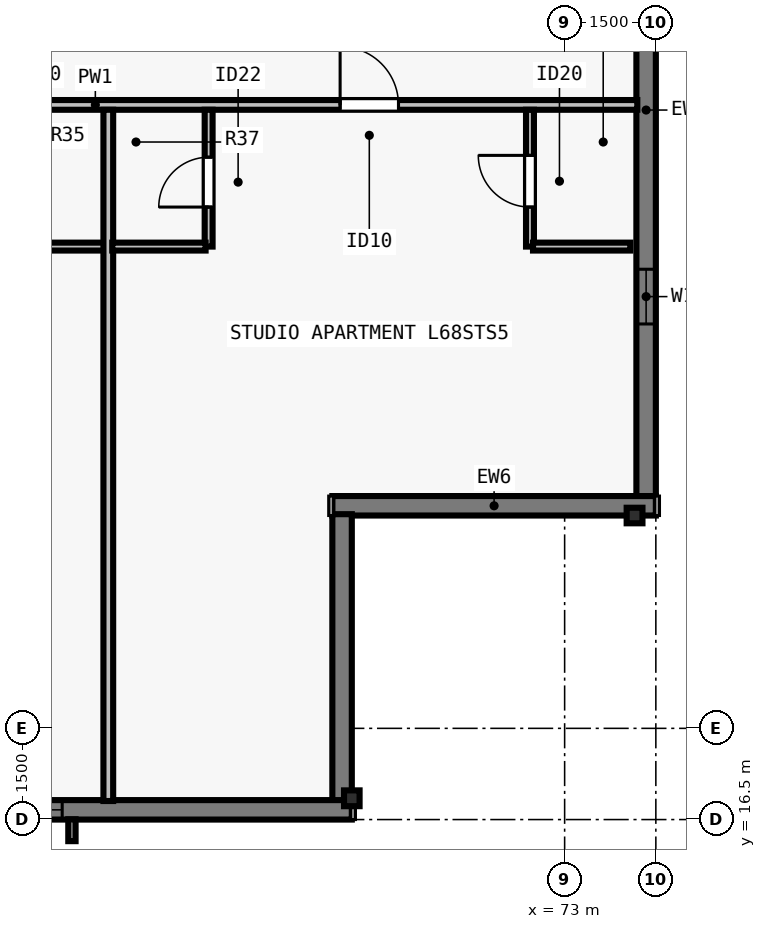
"""IFC4 building model, lengths in metres.
Left out: names, types, materials, properties, quantities, classifications, styles, units other than length and angle.
Written with IfcOpenShell. Run it as: python <this file> out.ifc"""

import sys

from ifc_helpers import new_model, si_unit, direction, frame, frame_2d, origin, origin_2d, place, context, subcontext, project, spatial, rectangle, i_section, extrude, element, fill, save


model = new_model("IFC4")
c1 = context("Model", 3, precision=1e-05, world=origin(), true_north=direction((0.0, 1.0)))
c2 = subcontext(c1, "Body", "Model", "MODEL_VIEW")
j1 = project(units=[si_unit("LENGTHUNIT", "METRE"), si_unit("PLANEANGLEUNIT", "RADIAN")], contexts=[c1])
p1 = place(None, origin())
s1 = spatial("IfcSite", under=j1, at=p1, CompositionType="ELEMENT")
p2 = place(p1, origin())
s2 = spatial("IfcBuilding", under=s1, at=p2, CompositionType="ELEMENT")
p3 = place(p2, frame((0.0, 0.0, 248.0)))
s3 = spatial("IfcBuildingStorey", under=s2, at=p3, CompositionType="ELEMENT", Elevation=248.0)
for number, where, z_axis, x_axis in (
    (1, (69.5, 16.85, 0.0), (0.0, 0.0, 1.0), (1.0, 0.0, 0.0)),
    (2, (74.15, 21.5, 0.0), (0.0, 0.0, 1.0), (0.0, 1.0, 0.0)),
):
    element("IfcColumn", number, at=place(p3, frame(where, z_axis=z_axis, x_axis=x_axis)), inside=s3, PredefinedType="COLUMN", context=c2, shape_type="SweptSolid", body=[
        extrude(i_section(OverallWidth=0.256, OverallDepth=0.26, WebThickness=0.01, FlangeThickness=0.017, FilletRadius=0.013, at=origin_2d()), origin(), (0.0, 0.0, 1.0), 3.5),
    ])
p4 = place(p3, frame((74.34, 56.5, 0.0), z_axis=(0.0, 0.0, 1.0), x_axis=(0.0, -1.0, 0.0)))
e3 = element("IfcWall", 3, at=p4, inside=s3, PredefinedType="SOLIDWALL", context=c2, shape_type="SweptSolid", body=[
    extrude(rectangle(XDim=34.702, YDim=0.32, at=frame_2d((17.351, 0.0))), origin(), (0.0, 0.0, 1.0), 3.29),
])
p5 = place(p4, frame((4.763, 0.0, 0.8)))
e4 = element("IfcOpeningElement", 4, at=p5, cuts=e3, PredefinedType="OPENING", context=c2, shape_type="SweptSolid", body=[
    extrude(rectangle(XDim=1.55, YDim=1.678, at=frame_2d((0.775, 0.839))), frame((0.0, 0.17, 0.0), z_axis=(0.0, -1.0, 0.0), x_axis=(1.0, 0.0, 0.0)), (0.0, 0.0, 1.0), 0.34),
])
p6 = place(p4, frame((9.238, 0.0, 0.8)))
e5 = element("IfcOpeningElement", 5, at=p6, cuts=e3, PredefinedType="OPENING", context=c2, shape_type="SweptSolid", body=[
    extrude(rectangle(XDim=1.85, YDim=1.678, at=frame_2d((0.925, 0.839))), frame((0.0, 0.17, 0.0), z_axis=(0.0, -1.0, 0.0), x_axis=(1.0, 0.0, 0.0)), (0.0, 0.0, 1.0), 0.34),
])
p7 = place(p4, frame((13.488, 0.0, 0.8)))
e6 = element("IfcOpeningElement", 6, at=p7, cuts=e3, PredefinedType="OPENING", context=c2, shape_type="SweptSolid", body=[
    extrude(rectangle(XDim=1.85, YDim=1.678, at=frame_2d((0.925, 0.839))), frame((0.0, 0.17, 0.0), z_axis=(0.0, -1.0, 0.0), x_axis=(1.0, 0.0, 0.0)), (0.0, 0.0, 1.0), 0.34),
])
p8 = place(p4, frame((18.264, 0.0, 0.8)))
e7 = element("IfcOpeningElement", 7, at=p8, cuts=e3, PredefinedType="OPENING", context=c2, shape_type="SweptSolid", body=[
    extrude(rectangle(XDim=1.55, YDim=1.678, at=frame_2d((0.775, 0.839))), frame((0.0, 0.17, 0.0), z_axis=(0.0, -1.0, 0.0), x_axis=(1.0, 0.0, 0.0)), (0.0, 0.0, 1.0), 0.34),
])
p9 = place(p4, frame((24.164, 0.0, 0.8)))
e8 = element("IfcOpeningElement", 8, at=p9, cuts=e3, PredefinedType="OPENING", context=c2, shape_type="SweptSolid", body=[
    extrude(rectangle(XDim=1.55, YDim=1.678, at=frame_2d((0.775, 0.839))), frame((0.0, 0.17, 0.0), z_axis=(0.0, -1.0, 0.0), x_axis=(1.0, 0.0, 0.0)), (0.0, 0.0, 1.0), 0.34),
])
p10 = place(p4, frame((30.95, 0.0, 0.8)))
e9 = element("IfcOpeningElement", 9, at=p10, cuts=e3, PredefinedType="OPENING", context=c2, shape_type="SweptSolid", body=[
    extrude(rectangle(XDim=0.9, YDim=1.678, at=frame_2d((0.45, 0.839))), frame((0.0, 0.17, 0.0), z_axis=(0.0, -1.0, 0.0), x_axis=(1.0, 0.0, 0.0)), (0.0, 0.0, 1.0), 0.34),
])
p11 = place(p3, frame((74.5, 21.66, 0.0), z_axis=(0.0, 0.0, 1.0), x_axis=(-1.0, 0.0, 0.0)))
e10 = element("IfcWall", 10, at=p11, inside=s3, PredefinedType="SOLIDWALL", context=c2, shape_type="SweptSolid", body=[
    extrude(rectangle(XDim=5.32, YDim=0.32, at=frame_2d((2.66, 0.0))), origin(), (0.0, 0.0, 1.0), 3.29),
])
p12 = place(p3, frame((69.34, 21.522, 0.0), z_axis=(0.0, 0.0, 1.0), x_axis=(0.0, -1.0, 0.0)))
e11 = element("IfcWall", 11, at=p12, inside=s3, PredefinedType="SOLIDWALL", context=c2, shape_type="SweptSolid", body=[
    extrude(rectangle(XDim=4.724, YDim=0.32, at=frame_2d((2.362, 0.0))), origin(), (0.0, 0.0, 1.0), 3.29),
])
p13 = place(p3, frame((69.5, 16.66, 0.0), z_axis=(0.0, 0.0, 1.0), x_axis=(-1.0, 0.0, 0.0)))
e12 = element("IfcWall", 12, at=p13, inside=s3, PredefinedType="SOLIDWALL", context=c2, shape_type="SweptSolid", body=[
    extrude(rectangle(XDim=34.702, YDim=0.32, at=frame_2d((17.351, 0.0))), origin(), (0.0, 0.0, 1.0), 3.29),
])
p14 = place(p13, frame((4.763, 0.0, 0.8)))
e13 = element("IfcOpeningElement", 13, at=p14, cuts=e12, PredefinedType="OPENING", context=c2, shape_type="SweptSolid", body=[
    extrude(rectangle(XDim=1.55, YDim=1.678, at=frame_2d((0.775, 0.839))), frame((0.0, 0.17, 0.0), z_axis=(0.0, -1.0, 0.0), x_axis=(1.0, 0.0, 0.0)), (0.0, 0.0, 1.0), 0.34),
])
p15 = place(p13, frame((7.988, 0.0, 0.8)))
e14 = element("IfcOpeningElement", 14, at=p15, cuts=e12, PredefinedType="OPENING", context=c2, shape_type="SweptSolid", body=[
    extrude(rectangle(XDim=1.85, YDim=1.678, at=frame_2d((0.925, 0.839))), frame((0.0, 0.17, 0.0), z_axis=(0.0, -1.0, 0.0), x_axis=(1.0, 0.0, 0.0)), (0.0, 0.0, 1.0), 0.34),
])
p16 = place(p13, frame((10.263, 0.0, 0.8)))
e15 = element("IfcOpeningElement", 15, at=p16, cuts=e12, PredefinedType="OPENING", context=c2, shape_type="SweptSolid", body=[
    extrude(rectangle(XDim=1.55, YDim=1.678, at=frame_2d((0.775, 0.839))), frame((0.0, 0.17, 0.0), z_axis=(0.0, -1.0, 0.0), x_axis=(1.0, 0.0, 0.0)), (0.0, 0.0, 1.0), 0.34),
])
p17 = place(p13, frame((14.738, 0.0, 0.8)))
e16 = element("IfcOpeningElement", 16, at=p17, cuts=e12, PredefinedType="OPENING", context=c2, shape_type="SweptSolid", body=[
    extrude(rectangle(XDim=1.85, YDim=1.678, at=frame_2d((0.925, 0.839))), frame((0.0, 0.17, 0.0), z_axis=(0.0, -1.0, 0.0), x_axis=(1.0, 0.0, 0.0)), (0.0, 0.0, 1.0), 0.34),
])
p18 = place(p13, frame((18.264, 0.0, 0.8)))
e17 = element("IfcOpeningElement", 17, at=p18, cuts=e12, PredefinedType="OPENING", context=c2, shape_type="SweptSolid", body=[
    extrude(rectangle(XDim=1.55, YDim=1.678, at=frame_2d((0.775, 0.839))), frame((0.0, 0.17, 0.0), z_axis=(0.0, -1.0, 0.0), x_axis=(1.0, 0.0, 0.0)), (0.0, 0.0, 1.0), 0.34),
])
p19 = place(p13, frame((25.014, 0.0, 0.8)))
e18 = element("IfcOpeningElement", 18, at=p19, cuts=e12, PredefinedType="OPENING", context=c2, shape_type="SweptSolid", body=[
    extrude(rectangle(XDim=1.55, YDim=1.678, at=frame_2d((0.775, 0.839))), frame((0.0, 0.17, 0.0), z_axis=(0.0, -1.0, 0.0), x_axis=(1.0, 0.0, 0.0)), (0.0, 0.0, 1.0), 0.34),
])
p20 = place(p13, frame((28.24, 0.0, 0.8)))
e19 = element("IfcOpeningElement", 19, at=p20, cuts=e12, PredefinedType="OPENING", context=c2, shape_type="SweptSolid", body=[
    extrude(rectangle(XDim=1.85, YDim=1.678, at=frame_2d((0.925, 0.839))), frame((0.0, 0.17, 0.0), z_axis=(0.0, -1.0, 0.0), x_axis=(1.0, 0.0, 0.0)), (0.0, 0.0, 1.0), 0.34),
])
p21 = place(p3, frame((29.915, 28.252, 0.0), z_axis=(0.0, 0.0, 1.0), x_axis=(1.0, 0.0, 0.0)))
e20 = element("IfcWall", 20, at=p21, inside=s3, PredefinedType="PARTITIONING", context=c2, shape_type="SweptSolid", body=[
    extrude(rectangle(XDim=44.28, YDim=0.16, at=frame_2d((22.14, 0.0))), origin(), (0.0, 0.0, 1.0), 2.958),
])
p22 = place(p21, frame((5.002, 0.0, 0.0)))
e21 = element("IfcOpeningElement", 21, at=p22, cuts=e20, PredefinedType="OPENING", context=c2, shape_type="SweptSolid", body=[
    extrude(rectangle(XDim=0.96, YDim=2.18, at=frame_2d((0.48, 1.09))), frame((0.0, 0.09, 0.0), z_axis=(0.0, -1.0, 0.0), x_axis=(1.0, 0.0, 0.0)), (0.0, 0.0, 1.0), 0.18),
])
p23 = place(p21, frame((12.718, 0.0, 0.0)))
e22 = element("IfcOpeningElement", 22, at=p23, cuts=e20, PredefinedType="OPENING", context=c2, shape_type="SweptSolid", body=[
    extrude(rectangle(XDim=0.96, YDim=2.18, at=frame_2d((0.48, 1.09))), frame((0.0, 0.09, 0.0), z_axis=(0.0, -1.0, 0.0), x_axis=(1.0, 0.0, 0.0)), (0.0, 0.0, 1.0), 0.18),
])
p24 = place(p21, frame((21.55, 0.0, 0.0)))
e23 = element("IfcOpeningElement", 23, at=p24, cuts=e20, PredefinedType="OPENING", context=c2, shape_type="SweptSolid", body=[
    extrude(rectangle(XDim=0.96, YDim=2.18, at=frame_2d((0.48, 1.09))), frame((0.0, 0.09, 0.0), z_axis=(0.0, -1.0, 0.0), x_axis=(1.0, 0.0, 0.0)), (0.0, 0.0, 1.0), 0.18),
])
p25 = place(p21, frame((30.382, 0.0, 0.0)))
e24 = element("IfcOpeningElement", 24, at=p25, cuts=e20, PredefinedType="OPENING", context=c2, shape_type="SweptSolid", body=[
    extrude(rectangle(XDim=0.96, YDim=2.18, at=frame_2d((0.48, 1.09))), frame((0.0, 0.09, 0.0), z_axis=(0.0, -1.0, 0.0), x_axis=(1.0, 0.0, 0.0)), (0.0, 0.0, 1.0), 0.18),
])
p26 = place(p21, frame((39.393, 0.0, 0.0)))
e25 = element("IfcOpeningElement", 25, at=p26, cuts=e20, PredefinedType="OPENING", context=c2, shape_type="SweptSolid", body=[
    extrude(rectangle(XDim=0.96, YDim=2.18, at=frame_2d((0.48, 1.09))), frame((0.0, 0.09, 0.0), z_axis=(0.0, -1.0, 0.0), x_axis=(1.0, 0.0, 0.0)), (0.0, 0.0, 1.0), 0.18),
])
p27 = place(p3, frame((63.896, 25.923, 0.0), z_axis=(0.0, 0.0, 1.0), x_axis=(1.0, 0.0, 0.0)))
e26 = element("IfcWall", 26, at=p27, inside=s3, PredefinedType="PLUMBINGWALL", context=c2, shape_type="SweptSolid", body=[
    extrude(rectangle(XDim=1.6, YDim=0.13, at=frame_2d((0.8, 0.0))), origin(), (0.0, 0.0, 1.0), 3.29),
])
p28 = place(p3, frame((65.496, 16.805, 0.0), z_axis=(0.0, 0.0, 1.0), x_axis=(0.0, 1.0, 0.0)))
e27 = element("IfcWall", 27, at=p28, inside=s3, PredefinedType="PARTITIONING", context=c2, shape_type="SweptSolid", body=[
    extrude(rectangle(XDim=11.368, YDim=0.16, at=frame_2d((5.684, 0.0))), origin(), (0.0, 0.0, 1.0), 2.573),
])
p29 = place(p3, frame((67.146, 25.923, 0.0), z_axis=(0.0, 0.0, 1.0), x_axis=(0.0, 1.0, 0.0)))
e28 = element("IfcWall", 28, at=p29, inside=s3, PredefinedType="PLUMBINGWALL", context=c2, shape_type="SweptSolid", body=[
    extrude(rectangle(XDim=2.25, YDim=0.13, at=frame_2d((1.125, 0.0))), origin(), (0.0, 0.0, 1.0), 3.29),
])
p30 = place(p29, frame((0.65, 0.0, 0.0)))
e29 = element("IfcOpeningElement", 29, at=p30, cuts=e28, PredefinedType="OPENING", context=c2, shape_type="SweptSolid", body=[
    extrude(rectangle(XDim=0.82, YDim=2.1, at=frame_2d((0.41, 1.05))), frame((0.0, 0.075, 0.0), z_axis=(0.0, -1.0, 0.0), x_axis=(1.0, 0.0, 0.0)), (0.0, 0.0, 1.0), 0.15),
])
p31 = place(p3, frame((65.561, 25.923, 0.0), z_axis=(0.0, 0.0, 1.0), x_axis=(1.0, 0.0, 0.0)))
e30 = element("IfcWall", 30, at=p31, inside=s3, PredefinedType="PLUMBINGWALL", context=c2, shape_type="SweptSolid", body=[
    extrude(rectangle(XDim=1.535, YDim=0.13, at=frame_2d((0.768, 0.0))), origin(), (0.0, 0.0, 1.0), 3.29),
])
p32 = place(p3, frame((72.43, 25.923, 0.0), z_axis=(0.0, 0.0, 1.0), x_axis=(0.0, 1.0, 0.0)))
e31 = element("IfcWall", 31, at=p32, inside=s3, PredefinedType="PLUMBINGWALL", context=c2, shape_type="SweptSolid", body=[
    extrude(rectangle(XDim=2.25, YDim=0.13, at=frame_2d((1.125, 0.0))), origin(), (0.0, 0.0, 1.0), 3.29),
])
p33 = place(p32, frame((0.65, 0.0, 0.0)))
e32 = element("IfcOpeningElement", 32, at=p33, cuts=e31, PredefinedType="OPENING", context=c2, shape_type="SweptSolid", body=[
    extrude(rectangle(XDim=0.85, YDim=2.1, at=frame_2d((0.425, 1.05))), frame((0.0, 0.075, 0.0), z_axis=(0.0, -1.0, 0.0), x_axis=(1.0, 0.0, 0.0)), (0.0, 0.0, 1.0), 0.15),
])
p34 = place(p3, frame((72.48, 25.923, 0.0), z_axis=(0.0, 0.0, 1.0), x_axis=(1.0, 0.0, 0.0)))
e33 = element("IfcWall", 33, at=p34, inside=s3, PredefinedType="PLUMBINGWALL", context=c2, shape_type="SweptSolid", body=[
    extrude(rectangle(XDim=1.6, YDim=0.13, at=frame_2d((0.8, 0.0))), origin(), (0.0, 0.0, 1.0), 3.29),
])
p35 = place(p14, origin())
e34 = element("IfcWindow", 34, at=p35, inside=s3, PartitioningType="SINGLE_PANEL", PredefinedType="WINDOW", context=c2, shape_type="SweptSolid", body=[
    extrude(rectangle(XDim=1.55, YDim=1.678, at=frame_2d((0.775, 0.839))), frame((0.0, -0.05, 0.0), z_axis=(0.0, -1.0, 0.0), x_axis=(1.0, 0.0, 0.0)), (0.0, 0.0, 1.0), 0.06),
])
fill(e13, e34)
p36 = place(p10, origin())
e35 = element("IfcWindow", 35, at=p36, inside=s3, PartitioningType="SINGLE_PANEL", PredefinedType="WINDOW", context=c2, shape_type="SweptSolid", body=[
    extrude(rectangle(XDim=0.9, YDim=1.678, at=frame_2d((0.45, 0.839))), frame((0.0, -0.04, 0.0), z_axis=(0.0, -1.0, 0.0), x_axis=(1.0, 0.0, 0.0)), (0.0, 0.0, 1.0), 0.06),
])
fill(e9, e35)
p37 = place(p30, origin())
e36 = element("IfcDoor", 36, at=p37, inside=s3, OperationType="SINGLE_SWING_LEFT", PredefinedType="DOOR", context=c2, shape_type="SweptSolid", body=[
    extrude(rectangle(XDim=0.82, YDim=2.1, at=frame_2d((0.41, 1.05))), frame((0.0, 0.025, 0.0), z_axis=(0.0, -1.0, 0.0), x_axis=(1.0, 0.0, 0.0)), (0.0, 0.0, 1.0), 0.05),
])
fill(e29, e36)
p38 = place(p33, origin())
e37 = element("IfcDoor", 37, at=p38, inside=s3, OperationType="SINGLE_SWING_RIGHT", PredefinedType="DOOR", context=c2, shape_type="SweptSolid", body=[
    extrude(rectangle(XDim=0.85, YDim=2.1, at=frame_2d((0.425, 1.05))), frame((0.0, 0.025, 0.0), z_axis=(0.0, -1.0, 0.0), x_axis=(1.0, 0.0, 0.0)), (0.0, 0.0, 1.0), 0.05),
])
fill(e32, e37)
p39 = place(p26, origin())
e38 = element("IfcDoor", 38, at=p39, inside=s3, OperationType="SINGLE_SWING_LEFT", PredefinedType="DOOR", context=c2, shape_type="SweptSolid", body=[
    extrude(rectangle(XDim=0.96, YDim=2.18, at=frame_2d((0.48, 1.09))), frame((0.0, 0.025, 0.0), z_axis=(0.0, -1.0, 0.0), x_axis=(1.0, 0.0, 0.0)), (0.0, 0.0, 1.0), 0.05),
])
fill(e25, e38)
save(model, sys.argv[1])
